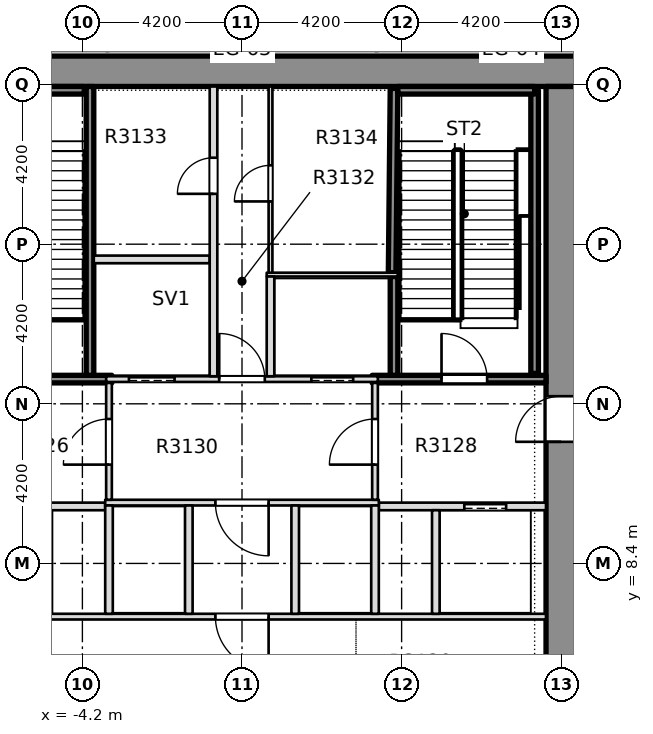
"""IFC4 building model, lengths in metres.
Left out: names, types, materials, properties, quantities, classifications, styles, units other than length and angle.
Written with IfcOpenShell. Run it as: python <this file> out.ifc"""

import sys

from ifc_helpers import new_model, si_unit, direction, frame, frame_2d, origin, place, context, subcontext, project, spatial, rectangle, extrude, element, fill, save


model = new_model("IFC4")
c1 = context("Model", 3, precision=1e-05, world=origin(), true_north=direction((0.0, 1.0)))
c2 = subcontext(c1, "Body", "Model", "MODEL_VIEW")
j1 = project(units=[si_unit("LENGTHUNIT", "METRE"), si_unit("PLANEANGLEUNIT", "RADIAN")], contexts=[c1])
p1 = place(None, origin())
s1 = spatial("IfcSite", under=j1, at=p1, CompositionType="ELEMENT")
p2 = place(p1, origin())
s2 = spatial("IfcBuilding", under=s1, at=p2, CompositionType="ELEMENT")
p3 = place(p2, frame((0.0, 0.0, 121.8)))
s3 = spatial("IfcBuildingStorey", under=s2, at=p3, CompositionType="ELEMENT", Elevation=121.8)
p4 = place(p3, frame((-11.8, 21.35, 0.0), z_axis=(0.0, 0.0, 1.0), x_axis=(1.0, 0.0, 0.0)))
e1 = element("IfcWall", 1, at=p4, inside=s3, PredefinedType="SHEAR", context=c2, shape_type="SweptSolid", body=[
    extrude(rectangle(XDim=23.6, YDim=0.8, at=frame_2d((11.8, 0.0))), origin(), (0.0, 0.0, 1.0), 6.1),
])
p5 = place(p3, frame((8.4, -7.6, 0.0), z_axis=(0.0, 0.0, 1.0), x_axis=(0.0, 1.0, 0.0)))
e2 = element("IfcWall", 2, at=p5, inside=s3, PredefinedType="SHEAR", context=c2, shape_type="SweptSolid", body=[
    extrude(rectangle(XDim=28.55, YDim=0.8, at=frame_2d((14.275, 0.0))), origin(), (0.0, 0.0, 1.0), 6.1),
])
p6 = place(p5, frame((19.2, 0.0, 0.0)))
e3 = element("IfcOpeningElement", 3, at=p6, cuts=e2, PredefinedType="OPENING", context=c2, shape_type="SweptSolid", body=[
    extrude(rectangle(XDim=1.2, YDim=2.1, at=frame_2d((0.6, 1.05))), frame((0.0, 0.41, 0.0), z_axis=(0.0, -1.0, 0.0), x_axis=(1.0, 0.0, 0.0)), (0.0, 0.0, 1.0), 0.82),
])
p7 = place(p3, frame((-7.999, 7.0, 0.0), z_axis=(0.0, 0.0, 1.0), x_axis=(1.0, 0.0, 0.0)))
e4 = element("IfcWall", 4, at=p7, inside=s3, PredefinedType="PARTITIONING", context=c2, shape_type="SweptSolid", body=[
    extrude(rectangle(XDim=15.998, YDim=0.15, at=frame_2d((7.999, 0.0))), origin(), (0.0, 0.0, 1.0), 6.1),
])
p8 = place(p7, frame((7.299, 0.0, 0.0)))
e5 = element("IfcOpeningElement", 5, at=p8, cuts=e4, PredefinedType="OPENING", context=c2, shape_type="SweptSolid", body=[
    extrude(rectangle(XDim=1.4, YDim=2.1, at=frame_2d((0.7, 1.05))), frame((0.0, 0.085, 0.0), z_axis=(0.0, -1.0, 0.0), x_axis=(1.0, 0.0, 0.0)), (0.0, 0.0, 1.0), 0.17),
])
p9 = place(p3, frame((-7.999, 9.9, 0.0), z_axis=(0.0, 0.0, 1.0), x_axis=(1.0, 0.0, 0.0)))
e6 = element("IfcWall", 6, at=p9, inside=s3, PredefinedType="PARTITIONING", context=c2, shape_type="SweptSolid", body=[
    extrude(rectangle(XDim=4.399, YDim=0.2, at=frame_2d((2.199, 0.0))), origin(), (0.0, 0.0, 1.0), 6.1),
])
p10 = place(p9, frame((1.049, 0.0, 0.0)))
e7 = element("IfcOpeningElement", 7, at=p10, cuts=e6, PredefinedType="OPENING", context=c2, shape_type="SweptSolid", body=[
    extrude(rectangle(XDim=1.1, YDim=2.1, at=frame_2d((0.55, 1.05))), frame((0.0, 0.11, 0.0), z_axis=(0.0, -1.0, 0.0), x_axis=(1.0, 0.0, 0.0)), (0.0, 0.0, 1.0), 0.22),
])
p11 = place(p3, frame((3.6, 9.9, 0.0), z_axis=(0.0, 0.0, 1.0), x_axis=(1.0, 0.0, 0.0)))
e8 = element("IfcWall", 8, at=p11, inside=s3, PredefinedType="PARTITIONING", context=c2, shape_type="SweptSolid", body=[
    extrude(rectangle(XDim=4.399, YDim=0.2, at=frame_2d((2.199, 0.0))), origin(), (0.0, 0.0, 1.0), 6.1),
])
p12 = place(p11, frame((2.25, 0.0, 0.0)))
e9 = element("IfcOpeningElement", 9, at=p12, cuts=e8, PredefinedType="OPENING", context=c2, shape_type="SweptSolid", body=[
    extrude(rectangle(XDim=1.1, YDim=2.1, at=frame_2d((0.55, 1.05))), frame((0.0, 0.11, 0.0), z_axis=(0.0, -1.0, 0.0), x_axis=(1.0, 0.0, 0.0)), (0.0, 0.0, 1.0), 0.22),
])
p13 = place(p3, frame((-3.6, 10.0, 0.0), z_axis=(0.0, 0.0, 1.0), x_axis=(1.0, 0.0, 0.0)))
e10 = element("IfcWall", 10, at=p13, inside=s3, PredefinedType="PARTITIONING", context=c2, shape_type="SweptSolid", body=[
    extrude(rectangle(XDim=7.2, YDim=0.15, at=frame_2d((3.6, 0.0))), origin(), (0.0, 0.0, 1.0), 6.1),
])
p14 = place(p13, frame((2.9, 0.0, 0.0)))
e11 = element("IfcOpeningElement", 11, at=p14, cuts=e10, PredefinedType="OPENING", context=c2, shape_type="SweptSolid", body=[
    extrude(rectangle(XDim=1.4, YDim=2.1, at=frame_2d((0.7, 1.05))), frame((0.0, 0.085, 0.0), z_axis=(0.0, -1.0, 0.0), x_axis=(1.0, 0.0, 0.0)), (0.0, 0.0, 1.0), 0.17),
])
p15 = place(p3, frame((-7.999, 13.25, 0.0), z_axis=(0.0, 0.0, 1.0), x_axis=(1.0, 0.0, 0.0)))
e12 = element("IfcWall", 12, at=p15, inside=s3, PredefinedType="SOLIDWALL", context=c2, shape_type="SweptSolid", body=[
    extrude(rectangle(XDim=4.574, YDim=0.2, at=frame_2d((2.287, 0.0))), origin(), (0.0, 0.0, 1.0), 6.1),
])
p16 = place(p15, frame((1.549, 0.0, 0.0)))
e13 = element("IfcOpeningElement", 13, at=p16, cuts=e12, PredefinedType="OPENING", context=c2, shape_type="SweptSolid", body=[
    extrude(rectangle(XDim=1.2, YDim=2.1, at=frame_2d((0.6, 1.05))), frame((0.0, 0.11, 0.0), z_axis=(0.0, -1.0, 0.0), x_axis=(1.0, 0.0, 0.0)), (0.0, 0.0, 1.0), 0.22),
])
p17 = place(p3, frame((-3.575, 13.25, 0.0), z_axis=(0.0, 0.0, 1.0), x_axis=(1.0, 0.0, 0.0)))
e14 = element("IfcWall", 14, at=p17, inside=s3, PredefinedType="PARTITIONING", context=c2, shape_type="SweptSolid", body=[
    extrude(rectangle(XDim=7.15, YDim=0.15, at=frame_2d((3.575, 0.0))), origin(), (0.0, 0.0, 1.0), 6.1),
])
p18 = place(p17, frame((0.6, 0.0, 0.0)))
e15 = element("IfcOpeningElement", 15, at=p18, cuts=e14, PredefinedType="OPENING", context=c2, shape_type="SweptSolid", body=[
    extrude(rectangle(XDim=1.2, YDim=2.1, at=frame_2d((0.6, 1.05))), frame((0.0, 0.085, 0.0), z_axis=(0.0, -1.0, 0.0), x_axis=(1.0, 0.0, 0.0)), (0.0, 0.0, 1.0), 0.17),
])
p19 = place(p17, frame((5.4, 0.0, 0.0)))
e16 = element("IfcOpeningElement", 16, at=p19, cuts=e14, PredefinedType="OPENING", context=c2, shape_type="SweptSolid", body=[
    extrude(rectangle(XDim=1.1, YDim=2.1, at=frame_2d((0.55, 1.05))), frame((0.0, 0.085, 0.0), z_axis=(0.0, -1.0, 0.0), x_axis=(1.0, 0.0, 0.0)), (0.0, 0.0, 1.0), 0.17),
])
p20 = place(p17, frame((2.975, 0.0, 0.0)))
e17 = element("IfcOpeningElement", 17, at=p20, cuts=e14, PredefinedType="OPENING", context=c2, shape_type="SweptSolid", body=[
    extrude(rectangle(XDim=1.2, YDim=2.1, at=frame_2d((0.6, 1.05))), frame((0.0, 0.085, 0.0), z_axis=(0.0, -1.0, 0.0), x_axis=(1.0, 0.0, 0.0)), (0.0, 0.0, 1.0), 0.17),
])
p21 = place(p3, frame((3.425, 13.25, 0.0), z_axis=(0.0, 0.0, 1.0), x_axis=(1.0, 0.0, 0.0)))
e18 = element("IfcWall", 18, at=p21, inside=s3, PredefinedType="SOLIDWALL", context=c2, shape_type="SweptSolid", body=[
    extrude(rectangle(XDim=4.574, YDim=0.2, at=frame_2d((2.287, 0.0))), origin(), (0.0, 0.0, 1.0), 6.1),
])
p22 = place(p21, frame((1.825, 0.0, 0.0)))
e19 = element("IfcOpeningElement", 19, at=p22, cuts=e18, PredefinedType="OPENING", context=c2, shape_type="SweptSolid", body=[
    extrude(rectangle(XDim=1.2, YDim=2.1, at=frame_2d((0.6, 1.05))), frame((0.0, 0.11, 0.0), z_axis=(0.0, -1.0, 0.0), x_axis=(1.0, 0.0, 0.0)), (0.0, 0.0, 1.0), 0.22),
])
p23 = place(p3, frame((0.65, 16.0, 0.0), z_axis=(0.0, 0.0, 1.0), x_axis=(1.0, 0.0, 0.0)))
e20 = element("IfcWall", 20, at=p23, inside=s3, PredefinedType="PARTITIONING", context=c2, shape_type="SweptSolid", body=[
    extrude(rectangle(XDim=3.45, YDim=0.1, at=frame_2d((1.725, 0.0))), origin(), (0.0, 0.0, 1.0), 6.1),
])
p24 = place(p3, frame((-3.9, 16.4, 0.0), z_axis=(0.0, 0.0, 1.0), x_axis=(1.0, 0.0, 0.0)))
e21 = element("IfcWall", 21, at=p24, inside=s3, PredefinedType="PARTITIONING", context=c2, shape_type="SweptSolid", body=[
    extrude(rectangle(XDim=3.05, YDim=0.2, at=frame_2d((1.525, 0.0))), origin(), (0.0, 0.0, 1.0), 6.1),
])
p25 = place(p3, frame((-4.0, 13.35, 0.0), z_axis=(0.0, 0.0, 1.0), x_axis=(0.0, 1.0, 0.0)))
e22 = element("IfcWall", 22, at=p25, inside=s3, PredefinedType="SOLIDWALL", context=c2, shape_type="SweptSolid", body=[
    extrude(rectangle(XDim=7.599, YDim=0.2, at=frame_2d((3.799, 0.0))), origin(), (0.0, 0.0, 1.0), 6.1),
])
p26 = place(p3, frame((-3.5, 7.075, 0.0), z_axis=(0.0, 0.0, 1.0), x_axis=(0.0, 1.0, 0.0)))
e23 = element("IfcWall", 23, at=p26, inside=s3, PredefinedType="PARTITIONING", context=c2, shape_type="SweptSolid", body=[
    extrude(rectangle(XDim=2.85, YDim=0.2, at=frame_2d((1.425, 0.0))), origin(), (0.0, 0.0, 1.0), 6.1),
])
p27 = place(p3, frame((-3.5, 10.075, 0.0), z_axis=(0.0, 0.0, 1.0), x_axis=(0.0, 1.0, 0.0)))
e24 = element("IfcWall", 24, at=p27, inside=s3, PredefinedType="PARTITIONING", context=c2, shape_type="SweptSolid", body=[
    extrude(rectangle(XDim=3.075, YDim=0.15, at=frame_2d((1.538, 0.0))), origin(), (0.0, 0.0, 1.0), 6.1),
])
p28 = place(p27, frame((0.925, 0.0, 0.0)))
e25 = element("IfcOpeningElement", 25, at=p28, cuts=e24, PredefinedType="OPENING", context=c2, shape_type="SweptSolid", body=[
    extrude(rectangle(XDim=1.2, YDim=2.1, at=frame_2d((0.6, 1.05))), frame((0.0, 0.085, 0.0), z_axis=(0.0, -1.0, 0.0), x_axis=(1.0, 0.0, 0.0)), (0.0, 0.0, 1.0), 0.17),
])
p29 = place(p3, frame((-1.4, 7.075, 0.0), z_axis=(0.0, 0.0, 1.0), x_axis=(0.0, 1.0, 0.0)))
e26 = element("IfcWall", 26, at=p29, inside=s3, PredefinedType="PARTITIONING", context=c2, shape_type="SweptSolid", body=[
    extrude(rectangle(XDim=2.85, YDim=0.2, at=frame_2d((1.425, 0.0))), origin(), (0.0, 0.0, 1.0), 6.1),
])
p30 = place(p3, frame((-0.75, 13.325, 0.0), z_axis=(0.0, 0.0, 1.0), x_axis=(0.0, 1.0, 0.0)))
e27 = element("IfcWall", 27, at=p30, inside=s3, PredefinedType="PARTITIONING", context=c2, shape_type="SweptSolid", body=[
    extrude(rectangle(XDim=7.624, YDim=0.2, at=frame_2d((3.812, 0.0))), origin(), (0.0, 0.0, 1.0), 6.1),
])
p31 = place(p30, frame((4.8, 0.0, 0.0)))
e28 = element("IfcOpeningElement", 28, at=p31, cuts=e27, PredefinedType="OPENING", context=c2, shape_type="SweptSolid", body=[
    extrude(rectangle(XDim=0.95, YDim=2.1, at=frame_2d((0.475, 1.05))), frame((0.0, 0.11, 0.0), z_axis=(0.0, -1.0, 0.0), x_axis=(1.0, 0.0, 0.0)), (0.0, 0.0, 1.0), 0.22),
])
p32 = place(p3, frame((0.75, 13.325, 0.0), z_axis=(0.0, 0.0, 1.0), x_axis=(0.0, 1.0, 0.0)))
e29 = element("IfcWall", 29, at=p32, inside=s3, PredefinedType="PARTITIONING", context=c2, shape_type="SweptSolid", body=[
    extrude(rectangle(XDim=2.625, YDim=0.2, at=frame_2d((1.312, 0.0))), origin(), (0.0, 0.0, 1.0), 6.1),
])
p33 = place(p3, frame((0.75, 16.05, 0.0), z_axis=(0.0, 0.0, 1.0), x_axis=(0.0, 1.0, 0.0)))
e30 = element("IfcWall", 30, at=p33, inside=s3, PredefinedType="PARTITIONING", context=c2, shape_type="SweptSolid", body=[
    extrude(rectangle(XDim=4.899, YDim=0.1, at=frame_2d((2.449, 0.0))), origin(), (0.0, 0.0, 1.0), 6.1),
])
p34 = place(p33, frame((1.875, 0.0, 0.0)))
e31 = element("IfcOpeningElement", 31, at=p34, cuts=e30, PredefinedType="OPENING", context=c2, shape_type="SweptSolid", body=[
    extrude(rectangle(XDim=0.95, YDim=2.1, at=frame_2d((0.475, 1.05))), frame((0.0, 0.06, 0.0), z_axis=(0.0, -1.0, 0.0), x_axis=(1.0, 0.0, 0.0)), (0.0, 0.0, 1.0), 0.12),
])
for number, where, z_axis, x_axis in (
    (32, (1.4, 7.075, 0.0), (0.0, 0.0, 1.0), (0.0, 1.0, 0.0)),
    (33, (3.5, 7.075, 0.0), (0.0, 0.0, 1.0), (0.0, 1.0, 0.0)),
):
    element("IfcWall", number, at=place(p3, frame(where, z_axis=z_axis, x_axis=x_axis)), inside=s3, PredefinedType="PARTITIONING", context=c2, shape_type="SweptSolid", body=[
        extrude(rectangle(XDim=2.85, YDim=0.2, at=frame_2d((1.425, 0.0))), origin(), (0.0, 0.0, 1.0), 6.1),
    ])
p35 = place(p3, frame((3.5, 10.075, 0.0), z_axis=(0.0, 0.0, 1.0), x_axis=(0.0, 1.0, 0.0)))
e34 = element("IfcWall", 34, at=p35, inside=s3, PredefinedType="PARTITIONING", context=c2, shape_type="SweptSolid", body=[
    extrude(rectangle(XDim=3.075, YDim=0.15, at=frame_2d((1.538, 0.0))), origin(), (0.0, 0.0, 1.0), 6.1),
])
p36 = place(p35, frame((0.925, 0.0, 0.0)))
e35 = element("IfcOpeningElement", 35, at=p36, cuts=e34, PredefinedType="OPENING", context=c2, shape_type="SweptSolid", body=[
    extrude(rectangle(XDim=1.2, YDim=2.1, at=frame_2d((0.6, 1.05))), frame((0.0, 0.085, 0.0), z_axis=(0.0, -1.0, 0.0), x_axis=(1.0, 0.0, 0.0)), (0.0, 0.0, 1.0), 0.17),
])
p37 = place(p3, frame((4.0, 13.35, 0.0), z_axis=(0.0, 0.0, 1.0), x_axis=(0.0, 1.0, 0.0)))
e36 = element("IfcWall", 36, at=p37, inside=s3, PredefinedType="SOLIDWALL", context=c2, shape_type="SweptSolid", body=[
    extrude(rectangle(XDim=2.6, YDim=0.2, at=frame_2d((1.3, 0.0))), origin(), (0.0, 0.0, 1.0), 6.1),
])
p38 = place(p3, frame((3.95, 16.05, 0.0), z_axis=(0.0, 0.0, 1.0), x_axis=(0.01032118628, 0.999946735138, 0.0)))
e37 = element("IfcWall", 37, at=p38, inside=s3, PredefinedType="SOLIDWALL", context=c2, shape_type="SweptSolid", body=[
    extrude(rectangle(XDim=4.849, YDim=0.2, at=frame_2d((2.425, 0.0))), origin(), (0.0, 0.0, 1.0), 6.1),
])
p39 = place(p3, frame((5.1, 7.075, 0.0), z_axis=(0.0, 0.0, 1.0), x_axis=(0.0, 1.0, 0.0)))
e38 = element("IfcWall", 38, at=p39, inside=s3, PredefinedType="PARTITIONING", context=c2, shape_type="SweptSolid", body=[
    extrude(rectangle(XDim=2.725, YDim=0.2, at=frame_2d((1.363, 0.0))), origin(), (0.0, 0.0, 1.0), 6.1),
])
p40 = place(p3, frame((-7.7, 20.85, 0.0), z_axis=(0.0, 0.0, 1.0), x_axis=(1.0, 0.0, 0.0)))
e39 = element("IfcWall", 39, at=p40, inside=s3, PredefinedType="SOLIDWALL", context=c2, shape_type="SweptSolid", body=[
    extrude(rectangle(XDim=3.55, YDim=0.2, at=frame_2d((1.775, 0.0))), origin(), (0.0, 0.0, 1.0), 6.1),
])
p41 = place(p3, frame((7.7, 13.4, 0.0), z_axis=(0.0, 0.0, 1.0), x_axis=(0.0, 1.0, 0.0)))
e40 = element("IfcWall", 40, at=p41, inside=s3, PredefinedType="SOLIDWALL", context=c2, shape_type="SweptSolid", body=[
    extrude(rectangle(XDim=7.45, YDim=0.2, at=frame_2d((3.725, 0.0))), origin(), (0.0, 0.0, 1.0), 6.1),
])
p42 = place(p3, frame((4.1, 20.85, 0.0), z_axis=(0.0, 0.0, 1.0), x_axis=(1.0, 0.0, 0.0)))
e41 = element("IfcWall", 41, at=p42, inside=s3, PredefinedType="SOLIDWALL", context=c2, shape_type="SweptSolid", body=[
    extrude(rectangle(XDim=3.6, YDim=0.2, at=frame_2d((1.8, 0.0))), origin(), (0.0, 0.0, 1.0), 6.1),
])
p43 = place(p22, origin())
e42 = element("IfcDoor", 42, at=p43, inside=s3, OperationType="SINGLE_SWING_RIGHT", PredefinedType="DOOR", context=c2, shape_type="SweptSolid", body=[
    extrude(rectangle(XDim=1.2, YDim=2.1, at=frame_2d((0.6, 1.05))), frame((0.0, 0.025, 0.0), z_axis=(0.0, -1.0, 0.0), x_axis=(1.0, 0.0, 0.0)), (0.0, 0.0, 1.0), 0.05),
])
fill(e19, e42)
p44 = place(p12, origin())
e43 = element("IfcDoor", 43, at=p44, inside=s3, OperationType="SLIDING_TO_LEFT", PredefinedType="DOOR", context=c2, shape_type="SweptSolid", body=[
    extrude(rectangle(XDim=1.1, YDim=2.1, at=frame_2d((0.55, 1.05))), frame((0.0, 0.025, 0.0), z_axis=(0.0, -1.0, 0.0), x_axis=(1.0, 0.0, 0.0)), (0.0, 0.0, 1.0), 0.05),
])
fill(e9, e43)
p45 = place(p8, origin())
e44 = element("IfcDoor", 44, at=p45, inside=s3, OperationType="SINGLE_SWING_RIGHT", PredefinedType="DOOR", context=c2, shape_type="SweptSolid", body=[
    extrude(rectangle(XDim=1.4, YDim=2.1, at=frame_2d((0.7, 1.05))), frame((0.0, 0.025, 0.0), z_axis=(0.0, -1.0, 0.0), x_axis=(1.0, 0.0, 0.0)), (0.0, 0.0, 1.0), 0.05),
])
fill(e5, e44)
p46 = place(p14, origin())
e45 = element("IfcDoor", 45, at=p46, inside=s3, OperationType="SINGLE_SWING_RIGHT", PredefinedType="DOOR", context=c2, shape_type="SweptSolid", body=[
    extrude(rectangle(XDim=1.4, YDim=2.1, at=frame_2d((0.7, 1.05))), frame((0.0, 0.025, 0.0), z_axis=(0.0, -1.0, 0.0), x_axis=(1.0, 0.0, 0.0)), (0.0, 0.0, 1.0), 0.05),
])
fill(e11, e45)
p47 = place(p18, origin())
e46 = element("IfcDoor", 46, at=p47, inside=s3, OperationType="SLIDING_TO_RIGHT", PredefinedType="DOOR", context=c2, shape_type="SweptSolid", body=[
    extrude(rectangle(XDim=1.2, YDim=2.1, at=frame_2d((0.6, 1.05))), frame((0.0, 0.025, 0.0), z_axis=(0.0, -1.0, 0.0), x_axis=(1.0, 0.0, 0.0)), (0.0, 0.0, 1.0), 0.05),
])
fill(e15, e46)
p48 = place(p19, origin())
e47 = element("IfcDoor", 47, at=p48, inside=s3, OperationType="SLIDING_TO_LEFT", PredefinedType="DOOR", context=c2, shape_type="SweptSolid", body=[
    extrude(rectangle(XDim=1.1, YDim=2.1, at=frame_2d((0.55, 1.05))), frame((0.0, 0.025, 0.0), z_axis=(0.0, -1.0, 0.0), x_axis=(1.0, 0.0, 0.0)), (0.0, 0.0, 1.0), 0.05),
])
fill(e16, e47)
p49 = place(p20, origin())
e48 = element("IfcDoor", 48, at=p49, inside=s3, OperationType="SINGLE_SWING_RIGHT", PredefinedType="DOOR", context=c2, shape_type="SweptSolid", body=[
    extrude(rectangle(XDim=1.2, YDim=2.1, at=frame_2d((0.6, 1.05))), frame((0.0, 0.025, 0.0), z_axis=(0.0, -1.0, 0.0), x_axis=(1.0, 0.0, 0.0)), (0.0, 0.0, 1.0), 0.05),
])
fill(e17, e48)
p50 = place(p31, origin())
e49 = element("IfcDoor", 49, at=p50, inside=s3, OperationType="SINGLE_SWING_RIGHT", PredefinedType="DOOR", context=c2, shape_type="SweptSolid", body=[
    extrude(rectangle(XDim=0.95, YDim=2.1, at=frame_2d((0.475, 1.05))), frame((0.0, 0.025, 0.0), z_axis=(0.0, -1.0, 0.0), x_axis=(1.0, 0.0, 0.0)), (0.0, 0.0, 1.0), 0.05),
])
fill(e28, e49)
p51 = place(p34, origin())
e50 = element("IfcDoor", 50, at=p51, inside=s3, OperationType="SINGLE_SWING_LEFT", PredefinedType="DOOR", context=c2, shape_type="SweptSolid", body=[
    extrude(rectangle(XDim=0.95, YDim=2.1, at=frame_2d((0.475, 1.05))), frame((0.0, 0.025, 0.0), z_axis=(0.0, -1.0, 0.0), x_axis=(1.0, 0.0, 0.0)), (0.0, 0.0, 1.0), 0.05),
])
fill(e31, e50)
p52 = place(p28, origin())
e51 = element("IfcDoor", 51, at=p52, inside=s3, OperationType="SINGLE_SWING_RIGHT", PredefinedType="DOOR", context=c2, shape_type="SweptSolid", body=[
    extrude(rectangle(XDim=1.2, YDim=2.1, at=frame_2d((0.6, 1.05))), frame((0.0, 0.025, 0.0), z_axis=(0.0, -1.0, 0.0), x_axis=(1.0, 0.0, 0.0)), (0.0, 0.0, 1.0), 0.05),
])
fill(e25, e51)
p53 = place(p36, origin())
e52 = element("IfcDoor", 52, at=p53, inside=s3, OperationType="SINGLE_SWING_LEFT", PredefinedType="DOOR", context=c2, shape_type="SweptSolid", body=[
    extrude(rectangle(XDim=1.2, YDim=2.1, at=frame_2d((0.6, 1.05))), frame((0.0, 0.025, 0.0), z_axis=(0.0, -1.0, 0.0), x_axis=(1.0, 0.0, 0.0)), (0.0, 0.0, 1.0), 0.05),
])
fill(e35, e52)
p54 = place(p6, origin())
e53 = element("IfcDoor", 53, at=p54, inside=s3, OperationType="SINGLE_SWING_LEFT", PredefinedType="DOOR", context=c2, shape_type="SweptSolid", body=[
    extrude(rectangle(XDim=1.2, YDim=2.1, at=frame_2d((0.6, 1.05))), frame((0.0, 0.025, 0.0), z_axis=(0.0, -1.0, 0.0), x_axis=(1.0, 0.0, 0.0)), (0.0, 0.0, 1.0), 0.05),
])
fill(e3, e53)
save(model, sys.argv[1])
